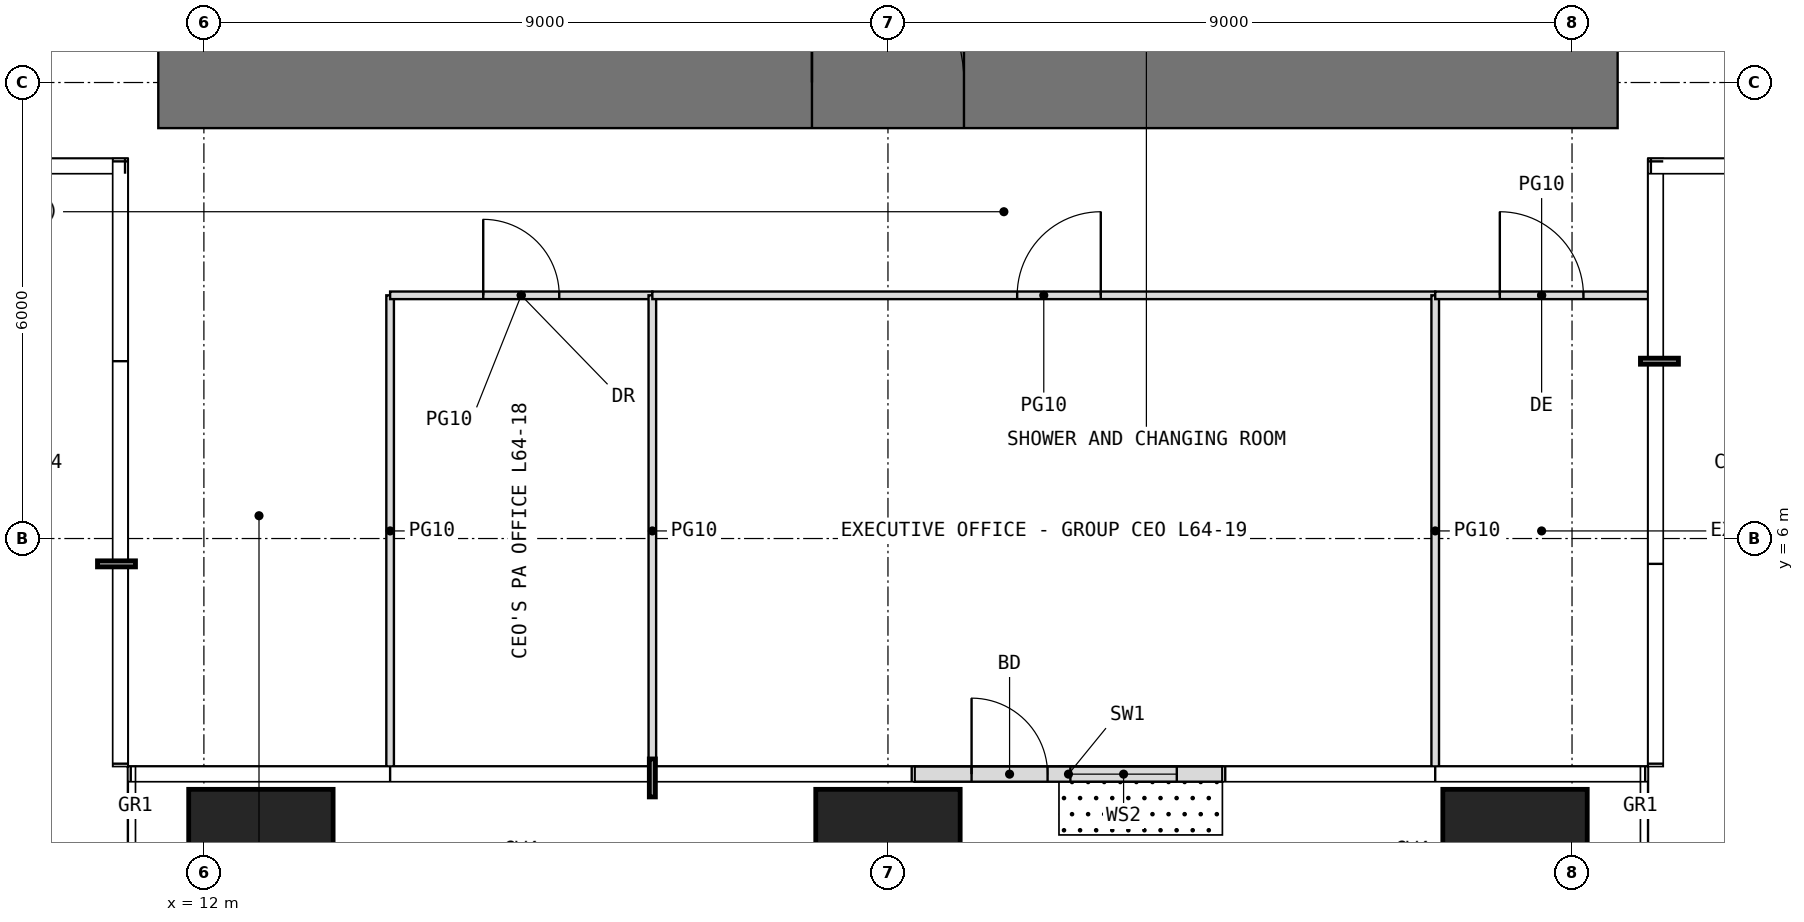
"""IFC4 building model, lengths in metres.
Left out: names, types, materials, properties, quantities, classifications, styles, units other than length and angle.
Written with IfcOpenShell. Run it as: python <this file> out.ifc"""

import sys

from ifc_helpers import new_model, si_unit, direction, frame, frame_2d, origin, origin_2d, place, context, subcontext, project, spatial, rectangle, extrude, element, fill, save


model = new_model("IFC4")
c1 = context("Model", 3, precision=1e-05, world=origin(), true_north=direction((0.0, 1.0)))
c2 = subcontext(c1, "Body", "Model", "MODEL_VIEW")
j1 = project(units=[si_unit("LENGTHUNIT", "METRE"), si_unit("PLANEANGLEUNIT", "RADIAN")], contexts=[c1])
p1 = place(None, origin())
s1 = spatial("IfcSite", under=j1, at=p1, CompositionType="ELEMENT")
p2 = place(p1, origin())
s2 = spatial("IfcBuilding", under=s1, at=p2, CompositionType="ELEMENT")
p3 = place(p2, frame((0.0, 0.0, 269.2)))
s3 = spatial("IfcBuildingStorey", under=s2, at=p3, CompositionType="ELEMENT", Elevation=269.2)
for number, where, z_axis, x_axis in (
    (1, (12.75, 1.75, 0.0), (0.0, 0.0, 1.0), (1.0, 0.0, 0.0)),
    (2, (21.0, 1.75, 0.0), (0.0, 0.0, 1.0), (1.0, 0.0, 0.0)),
    (3, (29.25, 1.75, 0.0), (0.0, 0.0, 1.0), (1.0, 0.0, 0.0)),
):
    element("IfcColumn", number, at=place(p3, frame(where, z_axis=z_axis, x_axis=x_axis)), inside=s3, PredefinedType="COLUMN", context=c2, shape_type="SweptSolid", body=[
        extrude(rectangle(XDim=1.9, YDim=1.9, at=origin_2d()), origin(), (0.0, 0.0, 1.0), 4.2),
    ])
p4 = place(p3, frame((21.35, 2.9, 0.0), z_axis=(0.0, 0.0, 1.0), x_axis=(1.0, 0.0, 0.0)))
e4 = element("IfcWall", 4, at=p4, inside=s3, PredefinedType="USERDEFINED", context=c2, shape_type="SweptSolid", body=[
    extrude(rectangle(XDim=4.05, YDim=0.2, at=frame_2d((2.025, 0.0))), origin(), (0.0, 0.0, 1.0), 3.95),
])
p5 = place(p4, frame((0.75, 0.0, 0.0)))
e5 = element("IfcOpeningElement", 5, at=p5, cuts=e4, PredefinedType="OPENING", context=c2, shape_type="SweptSolid", body=[
    extrude(rectangle(XDim=1.0, YDim=2.4, at=frame_2d((0.5, 1.2))), frame((0.0, 0.11, 0.0), z_axis=(0.0, -1.0, 0.0), x_axis=(1.0, 0.0, 0.0)), (0.0, 0.0, 1.0), 0.22),
])
p6 = place(p4, frame((2.05, 0.0, 0.3)))
e6 = element("IfcOpeningElement", 6, at=p6, cuts=e4, PredefinedType="OPENING", context=c2, shape_type="SweptSolid", body=[
    extrude(rectangle(XDim=1.4, YDim=2.7, at=frame_2d((0.7, 1.35))), frame((0.0, 0.11, 0.0), z_axis=(0.0, -1.0, 0.0), x_axis=(1.0, 0.0, 0.0)), (0.0, 0.0, 1.0), 0.22),
])
p7 = place(p3, frame((11.4, 12.0, -0.05), z_axis=(0.0, 0.0, 1.0), x_axis=(1.0, 0.0, 0.0)))
e7 = element("IfcWall", 7, at=p7, inside=s3, PredefinedType="SHEAR", context=c2, shape_type="SweptSolid", body=[
    extrude(rectangle(XDim=19.2, YDim=1.2, at=frame_2d((9.6, 0.0))), origin(), (0.0, 0.0, 1.0), 4.2),
])
p8 = place(p7, frame((8.6, 0.0, 0.05)))
e8 = element("IfcOpeningElement", 8, at=p8, cuts=e7, PredefinedType="OPENING", context=c2, shape_type="SweptSolid", body=[
    extrude(rectangle(XDim=2.0, YDim=2.2, at=frame_2d((1.0, 1.1))), frame((0.0, 0.61, 0.0), z_axis=(0.0, -1.0, 0.0), x_axis=(1.0, 0.0, 0.0)), (0.0, 0.0, 1.0), 1.22),
])
p9 = place(p3, frame((14.45, 3.0, 0.0), z_axis=(0.0, 0.0, 1.0), x_axis=(0.0, 1.0, 0.0)))
e9 = element("IfcWall", 9, at=p9, inside=s3, PredefinedType="PARTITIONING", context=c2, shape_type="SweptSolid", body=[
    extrude(rectangle(XDim=6.2, YDim=0.1, at=frame_2d((3.1, 0.0))), origin(), (0.0, 0.0, 1.0), 3.95),
])
p10 = place(p3, frame((14.45, 9.2, 0.0), z_axis=(0.0, 0.0, 1.0), x_axis=(1.0, 0.0, 0.0)))
e10 = element("IfcWall", 10, at=p10, inside=s3, PredefinedType="PARTITIONING", context=c2, shape_type="SweptSolid", body=[
    extrude(rectangle(XDim=3.45, YDim=0.1, at=frame_2d((1.725, 0.0))), origin(), (0.0, 0.0, 1.0), 3.95),
])
p11 = place(p10, frame((1.225, 0.0, 0.0)))
e11 = element("IfcOpeningElement", 11, at=p11, cuts=e10, PredefinedType="OPENING", context=c2, shape_type="SweptSolid", body=[
    extrude(rectangle(XDim=1.0, YDim=2.2, at=frame_2d((0.5, 1.1))), frame((0.0, 0.06, 0.0), z_axis=(0.0, -1.0, 0.0), x_axis=(1.0, 0.0, 0.0)), (0.0, 0.0, 1.0), 0.12),
])
p12 = place(p3, frame((17.9, 3.0, 0.0), z_axis=(0.0, 0.0, 1.0), x_axis=(0.0, 1.0, 0.0)))
e12 = element("IfcWall", 12, at=p12, inside=s3, PredefinedType="PARTITIONING", context=c2, shape_type="SweptSolid", body=[
    extrude(rectangle(XDim=6.2, YDim=0.1, at=frame_2d((3.1, 0.0))), origin(), (0.0, 0.0, 1.0), 3.95),
])
p13 = place(p3, frame((17.9, 9.2, 0.0), z_axis=(0.0, 0.0, 1.0), x_axis=(1.0, 0.0, 0.0)))
e13 = element("IfcWall", 13, at=p13, inside=s3, PredefinedType="PARTITIONING", context=c2, shape_type="SweptSolid", body=[
    extrude(rectangle(XDim=10.3, YDim=0.1, at=frame_2d((5.15, 0.0))), origin(), (0.0, 0.0, 1.0), 3.95),
])
p14 = place(p13, frame((4.8, 0.0, 0.0)))
e14 = element("IfcOpeningElement", 14, at=p14, cuts=e13, PredefinedType="OPENING", context=c2, shape_type="SweptSolid", body=[
    extrude(rectangle(XDim=1.1, YDim=2.3, at=frame_2d((0.55, 1.15))), frame((0.0, 0.06, 0.0), z_axis=(0.0, -1.0, 0.0), x_axis=(1.0, 0.0, 0.0)), (0.0, 0.0, 1.0), 0.12),
])
p15 = place(p3, frame((28.2, 3.0, 0.0), z_axis=(0.0, 0.0, 1.0), x_axis=(0.0, 1.0, 0.0)))
e15 = element("IfcWall", 15, at=p15, inside=s3, PredefinedType="PARTITIONING", context=c2, shape_type="SweptSolid", body=[
    extrude(rectangle(XDim=6.2, YDim=0.1, at=frame_2d((3.1, 0.0))), origin(), (0.0, 0.0, 1.0), 3.95),
])
p16 = place(p3, frame((28.2, 9.2, 0.0), z_axis=(0.0, 0.0, 1.0), x_axis=(1.0, 0.0, 0.0)))
e16 = element("IfcWall", 16, at=p16, inside=s3, PredefinedType="PARTITIONING", context=c2, shape_type="SweptSolid", body=[
    extrude(rectangle(XDim=2.8, YDim=0.1, at=frame_2d((1.4, 0.0))), origin(), (0.0, 0.0, 1.0), 3.95),
])
p17 = place(p16, frame((0.85, 0.0, 0.0)))
e17 = element("IfcOpeningElement", 17, at=p17, cuts=e16, PredefinedType="OPENING", context=c2, shape_type="SweptSolid", body=[
    extrude(rectangle(XDim=1.1, YDim=2.3, at=frame_2d((0.55, 1.15))), frame((0.0, 0.06, 0.0), z_axis=(0.0, -1.0, 0.0), x_axis=(1.0, 0.0, 0.0)), (0.0, 0.0, 1.0), 0.12),
])
p18 = place(p5, origin())
e18 = element("IfcDoor", 18, at=p18, inside=s3, OperationType="SINGLE_SWING_LEFT", PredefinedType="DOOR", context=c2, shape_type="SweptSolid", body=[
    extrude(rectangle(XDim=1.0, YDim=2.4, at=frame_2d((0.5, 1.2))), frame((0.0, 0.025, 0.0), z_axis=(0.0, -1.0, 0.0), x_axis=(1.0, 0.0, 0.0)), (0.0, 0.0, 1.0), 0.05),
])
fill(e5, e18)
p19 = place(p6, origin())
e19 = element("IfcWindow", 19, at=p19, inside=s3, PartitioningType="SINGLE_PANEL", PredefinedType="WINDOW", context=c2, shape_type="SweptSolid", body=[
    extrude(rectangle(XDim=1.4, YDim=2.7, at=frame_2d((0.7, 1.35))), frame((0.0, 0.03, 0.0), z_axis=(0.0, -1.0, 0.0), x_axis=(1.0, 0.0, 0.0)), (0.0, 0.0, 1.0), 0.06),
])
fill(e6, e19)
p20 = place(p8, origin())
e20 = element("IfcDoor", 20, at=p20, inside=s3, OperationType="DOUBLE_DOOR_SINGLE_SWING", PredefinedType="DOOR", context=c2, shape_type="SweptSolid", body=[
    extrude(rectangle(XDim=2.0, YDim=2.2, at=frame_2d((1.0, 1.1))), frame((0.0, 0.025, 0.0), z_axis=(0.0, -1.0, 0.0), x_axis=(1.0, 0.0, 0.0)), (0.0, 0.0, 1.0), 0.05),
])
fill(e8, e20)
p21 = place(p11, origin())
e21 = element("IfcDoor", 21, at=p21, inside=s3, OperationType="SINGLE_SWING_LEFT", PredefinedType="DOOR", context=c2, shape_type="SweptSolid", body=[
    extrude(rectangle(XDim=1.0, YDim=2.2, at=frame_2d((0.5, 1.1))), frame((0.0, 0.025, 0.0), z_axis=(0.0, -1.0, 0.0), x_axis=(1.0, 0.0, 0.0)), (0.0, 0.0, 1.0), 0.05),
])
fill(e11, e21)
p22 = place(p14, origin())
e22 = element("IfcDoor", 22, at=p22, inside=s3, OperationType="SINGLE_SWING_RIGHT", PredefinedType="DOOR", context=c2, shape_type="SweptSolid", body=[
    extrude(rectangle(XDim=1.1, YDim=2.3, at=frame_2d((0.55, 1.15))), frame((0.0, 0.025, 0.0), z_axis=(0.0, -1.0, 0.0), x_axis=(1.0, 0.0, 0.0)), (0.0, 0.0, 1.0), 0.05),
])
fill(e14, e22)
p23 = place(p17, origin())
e23 = element("IfcDoor", 23, at=p23, inside=s3, OperationType="SINGLE_SWING_LEFT", PredefinedType="DOOR", context=c2, shape_type="SweptSolid", body=[
    extrude(rectangle(XDim=1.1, YDim=2.3, at=frame_2d((0.55, 1.15))), frame((0.0, 0.025, 0.0), z_axis=(0.0, -1.0, 0.0), x_axis=(1.0, 0.0, 0.0)), (0.0, 0.0, 1.0), 0.05),
])
fill(e17, e23)
save(model, sys.argv[1])
